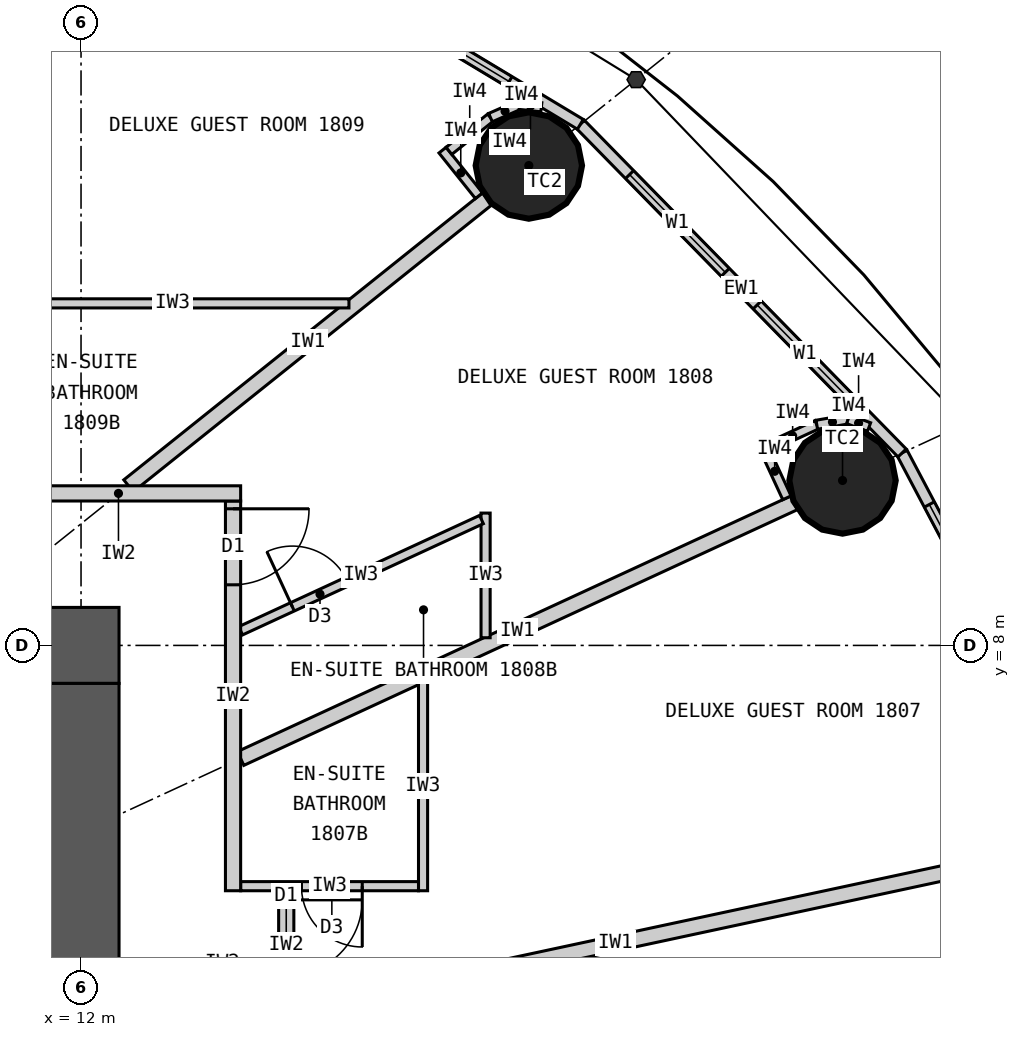
"""IFC4 building model, lengths in metres.
Left out: names, types, materials, properties, quantities, classifications, styles, units other than length and angle.
Written with IfcOpenShell. Run it as: python <this file> out.ifc"""

import sys

from ifc_helpers import new_model, si_unit, direction, frame, frame_2d, origin, origin_2d, place, context, subcontext, project, spatial, rectangle, circle, extrude, element, fill, save


model = new_model("IFC4")
c1 = context("Model", 3, precision=1e-05, world=origin(), true_north=direction((0.0, 1.0)))
c2 = subcontext(c1, "Body", "Model", "MODEL_VIEW")
j1 = project(units=[si_unit("LENGTHUNIT", "METRE"), si_unit("PLANEANGLEUNIT", "RADIAN")], contexts=[c1])
p1 = place(None, origin())
s1 = spatial("IfcSite", under=j1, at=p1, CompositionType="ELEMENT")
p2 = place(p1, origin())
s2 = spatial("IfcBuilding", under=s1, at=p2, CompositionType="ELEMENT")
p3 = place(p2, frame((0.0, 0.0, 73.8)))
s3 = spatial("IfcBuildingStorey", under=s2, at=p3, CompositionType="ELEMENT", Elevation=73.8)
for number, where, z_axis, x_axis in (
    (1, (22.019, 10.17, 0.0), (0.0, 0.0, 1.0), (1.0, 0.0, 0.0)),
    (2, (17.892, 14.313, 0.0), (0.0, 0.0, 1.0), (1.0, 0.0, 0.0)),
):
    element("IfcColumn", number, at=place(p3, frame(where, z_axis=z_axis, x_axis=x_axis)), inside=s3, PredefinedType="COLUMN", context=c2, shape_type="SweptSolid", body=[
        extrude(circle(Radius=0.7, at=origin_2d()), origin(), (0.0, 0.0, 1.0), 3.3),
    ])
p4 = place(p3, frame((-12.5, 8.0, 0.0), z_axis=(0.0, 0.0, 1.0), x_axis=(1.0, 0.0, 0.0)))
e3 = element("IfcWall", 3, at=p4, inside=s3, PredefinedType="SHEAR", context=c2, shape_type="SweptSolid", body=[
    extrude(rectangle(XDim=25.0, YDim=1.0, at=frame_2d((12.5, 0.0))), origin(), (0.0, 0.0, 1.0), 3.3),
])
p5 = place(p4, frame((11.2, 0.0, 0.0)))
e4 = element("IfcOpeningElement", 4, at=p5, cuts=e3, PredefinedType="OPENING", context=c2, shape_type="SweptSolid", body=[
    extrude(rectangle(XDim=1.2, YDim=2.2, at=frame_2d((0.6, 1.1))), frame((0.0, 0.51, 0.0), z_axis=(0.0, -1.0, 0.0), x_axis=(1.0, 0.0, 0.0)), (0.0, 0.0, 1.0), 1.02),
])
p6 = place(p4, frame((18.8, 0.0, 0.0)))
e5 = element("IfcOpeningElement", 5, at=p6, cuts=e3, PredefinedType="OPENING", context=c2, shape_type="SweptSolid", body=[
    extrude(rectangle(XDim=0.9, YDim=2.2, at=frame_2d((0.45, 1.1))), frame((0.0, 0.51, 0.0), z_axis=(0.0, -1.0, 0.0), x_axis=(1.0, 0.0, 0.0)), (0.0, 0.0, 1.0), 1.02),
])
p7 = place(p3, frame((12.0, -7.5, 0.0), z_axis=(0.0, 0.0, 1.0), x_axis=(0.0, 1.0, 0.0)))
e6 = element("IfcWall", 6, at=p7, inside=s3, PredefinedType="SHEAR", context=c2, shape_type="SweptSolid", body=[
    extrude(rectangle(XDim=15.0, YDim=1.0, at=frame_2d((7.5, 0.0))), origin(), (0.0, 0.0, 1.0), 3.3),
])
p8 = place(p7, frame((6.6, 0.0, 0.0)))
e7 = element("IfcOpeningElement", 7, at=p8, cuts=e6, PredefinedType="OPENING", context=c2, shape_type="SweptSolid", body=[
    extrude(rectangle(XDim=1.8, YDim=2.2, at=frame_2d((0.9, 1.1))), frame((0.0, 0.51, 0.0), z_axis=(0.0, -1.0, 0.0), x_axis=(1.0, 0.0, 0.0)), (0.0, 0.0, 1.0), 1.02),
])
p9 = place(p3, frame((25.482, 5.462, 0.0), z_axis=(0.0, 0.0, 1.0), x_axis=(-0.467296867008, 0.884100468321, 0.0)))
e8 = element("IfcWall", 8, at=p9, inside=s3, PredefinedType="ELEMENTEDWALL", context=c2, shape_type="SweptSolid", body=[
    extrude(rectangle(XDim=5.734, YDim=0.15, at=frame_2d((2.867, 0.0))), origin(), (0.0, 0.0, 1.0), 3.12),
])
p10 = place(p9, frame((0.767, 0.0, 0.9)))
e9 = element("IfcOpeningElement", 9, at=p10, cuts=e8, PredefinedType="OPENING", context=c2, shape_type="SweptSolid", body=[
    extrude(rectangle(XDim=1.8, YDim=1.9, at=frame_2d((0.9, 0.95))), frame((0.0, 0.085, 0.0), z_axis=(0.0, -1.0, 0.0), x_axis=(1.0, 0.0, 0.0)), (0.0, 0.0, 1.0), 0.17),
])
p11 = place(p9, frame((3.167, 0.0, 0.9)))
e10 = element("IfcOpeningElement", 10, at=p11, cuts=e8, PredefinedType="OPENING", context=c2, shape_type="SweptSolid", body=[
    extrude(rectangle(XDim=1.8, YDim=1.9, at=frame_2d((0.9, 0.95))), frame((0.0, 0.085, 0.0), z_axis=(0.0, -1.0, 0.0), x_axis=(1.0, 0.0, 0.0)), (0.0, 0.0, 1.0), 0.17),
])
p12 = place(p3, frame((22.803, 10.532, 0.0), z_axis=(0.0, 0.0, 1.0), x_axis=(-0.699602905915, 0.714531856557, 0.0)))
e11 = element("IfcWall", 11, at=p12, inside=s3, PredefinedType="ELEMENTEDWALL", context=c2, shape_type="SweptSolid", body=[
    extrude(rectangle(XDim=6.051, YDim=0.15, at=frame_2d((3.025, 0.0))), origin(), (0.0, 0.0, 1.0), 3.12),
])
p13 = place(p12, frame((0.926, 0.0, 0.9)))
e12 = element("IfcOpeningElement", 12, at=p13, cuts=e11, PredefinedType="OPENING", context=c2, shape_type="SweptSolid", body=[
    extrude(rectangle(XDim=1.8, YDim=1.9, at=frame_2d((0.9, 0.95))), frame((0.0, 0.085, 0.0), z_axis=(0.0, -1.0, 0.0), x_axis=(1.0, 0.0, 0.0)), (0.0, 0.0, 1.0), 0.17),
])
p14 = place(p12, frame((3.325, 0.0, 0.9)))
e13 = element("IfcOpeningElement", 13, at=p14, cuts=e11, PredefinedType="OPENING", context=c2, shape_type="SweptSolid", body=[
    extrude(rectangle(XDim=1.8, YDim=1.9, at=frame_2d((0.9, 0.95))), frame((0.0, 0.085, 0.0), z_axis=(0.0, -1.0, 0.0), x_axis=(1.0, 0.0, 0.0)), (0.0, 0.0, 1.0), 0.17),
])
p15 = place(p3, frame((18.57, 14.856, 0.0), z_axis=(0.0, 0.0, 1.0), x_axis=(-0.856983180864, 0.515344377787, 0.0)))
e14 = element("IfcWall", 14, at=p15, inside=s3, PredefinedType="ELEMENTEDWALL", context=c2, shape_type="SweptSolid", body=[
    extrude(rectangle(XDim=6.386, YDim=0.15, at=frame_2d((3.193, 0.0))), origin(), (0.0, 0.0, 1.0), 3.12),
])
p16 = place(p15, frame((1.093, 0.0, 0.9)))
e15 = element("IfcOpeningElement", 15, at=p16, cuts=e14, PredefinedType="OPENING", context=c2, shape_type="SweptSolid", body=[
    extrude(rectangle(XDim=1.8, YDim=1.9, at=frame_2d((0.9, 0.95))), frame((0.0, 0.085, 0.0), z_axis=(0.0, -1.0, 0.0), x_axis=(1.0, 0.0, 0.0)), (0.0, 0.0, 1.0), 0.17),
])
p17 = place(p15, frame((3.493, 0.0, 0.9)))
e16 = element("IfcOpeningElement", 16, at=p17, cuts=e14, PredefinedType="OPENING", context=c2, shape_type="SweptSolid", body=[
    extrude(rectangle(XDim=1.8, YDim=1.9, at=frame_2d((0.9, 0.95))), frame((0.0, 0.085, 0.0), z_axis=(0.0, -1.0, 0.0), x_axis=(1.0, 0.0, 0.0)), (0.0, 0.0, 1.0), 0.17),
])
p18 = place(p3, frame((14.1, 3.022, 0.0), z_axis=(0.0, 0.0, 1.0), x_axis=(0.977790014929, 0.209586943072, 0.0)))
e17 = element("IfcWall", 17, at=p18, inside=s3, PredefinedType="PARTITIONING", context=c2, shape_type="SweptSolid", body=[
    extrude(rectangle(XDim=10.087, YDim=0.2, at=frame_2d((5.043, 0.0))), origin(), (0.0, 0.0, 1.0), 2.32),
])
p19 = place(p3, frame((14.1, 6.512, 0.0), z_axis=(0.0, 0.0, 1.0), x_axis=(0.907832871056, 0.419332181247, 0.0)))
e18 = element("IfcWall", 18, at=p19, inside=s3, PredefinedType="PARTITIONING", context=c2, shape_type="SweptSolid", body=[
    extrude(rectangle(XDim=8.023, YDim=0.2, at=frame_2d((4.011, 0.0))), origin(), (0.0, 0.0, 1.0), 2.32),
])
p20 = place(p3, frame((12.625, 10.1, 0.0), z_axis=(0.0, 0.0, 1.0), x_axis=(0.780892451574, 0.624665493744, 0.0)))
e19 = element("IfcWall", 19, at=p20, inside=s3, PredefinedType="PARTITIONING", context=c2, shape_type="SweptSolid", body=[
    extrude(rectangle(XDim=6.045, YDim=0.2, at=frame_2d((3.022, 0.0))), origin(), (0.0, 0.0, 1.0), 2.32),
])
p21 = place(p3, frame((7.289, 10.1, 0.0), z_axis=(0.0, 0.0, 1.0), x_axis=(0.585198353053, 0.810890182197, 0.0)))
e20 = element("IfcWall", 20, at=p21, inside=s3, PredefinedType="PARTITIONING", context=c2, shape_type="SweptSolid", body=[
    extrude(rectangle(XDim=8.36, YDim=0.2, at=frame_2d((4.18, 0.0))), origin(), (0.0, 0.0, 1.0), 2.32),
])
p22 = place(p3, frame((16.5, 7.521, 0.0), z_axis=(0.0, 0.0, 1.0), x_axis=(0.0, -1.0, 0.0)))
e21 = element("IfcWall", 21, at=p22, inside=s3, PredefinedType="PARTITIONING", context=c2, shape_type="SweptSolid", body=[
    extrude(rectangle(XDim=2.749, YDim=0.12, at=frame_2d((1.374, 0.0))), origin(), (0.0, 0.0, 1.0), 3.12),
])
p23 = place(p3, frame((14.1, 4.833, 0.0), z_axis=(0.0, 0.0, 1.0), x_axis=(1.0, 0.0, 0.0)))
e22 = element("IfcWall", 22, at=p23, inside=s3, PredefinedType="PARTITIONING", context=c2, shape_type="SweptSolid", body=[
    extrude(rectangle(XDim=2.34, YDim=0.12, at=frame_2d((1.17, 0.0))), origin(), (0.0, 0.0, 1.0), 3.12),
])
p24 = place(p23, frame((0.8, 0.0, 0.0)))
e23 = element("IfcOpeningElement", 23, at=p24, cuts=e22, PredefinedType="OPENING", context=c2, shape_type="SweptSolid", body=[
    extrude(rectangle(XDim=0.8, YDim=2.1, at=frame_2d((0.4, 1.05))), frame((0.0, 0.07, 0.0), z_axis=(0.0, -1.0, 0.0), x_axis=(1.0, 0.0, 0.0)), (0.0, 0.0, 1.0), 0.14),
])
p25 = place(p3, frame((17.323, 8.101, 0.0), z_axis=(0.0, 0.0, 1.0), x_axis=(0.0, 1.0, 0.0)))
e24 = element("IfcWall", 24, at=p25, inside=s3, PredefinedType="PARTITIONING", context=c2, shape_type="SweptSolid", body=[
    extrude(rectangle(XDim=1.64, YDim=0.12, at=frame_2d((0.82, 0.0))), origin(), (0.0, 0.0, 1.0), 3.12),
])
p26 = place(p3, frame((14.1, 8.193, 0.0), z_axis=(0.0, 0.0, 1.0), x_axis=(0.907836493557, 0.419324338628, 0.0)))
e25 = element("IfcWall", 25, at=p26, inside=s3, PredefinedType="PARTITIONING", context=c2, shape_type="SweptSolid", body=[
    extrude(rectangle(XDim=3.49, YDim=0.12, at=frame_2d((1.745, 0.0))), origin(), (0.0, 0.0, 1.0), 3.12),
])
p27 = place(p26, frame((0.75, 0.0, 0.0)))
e26 = element("IfcOpeningElement", 26, at=p27, cuts=e25, PredefinedType="OPENING", context=c2, shape_type="SweptSolid", body=[
    extrude(rectangle(XDim=0.8, YDim=2.1, at=frame_2d((0.4, 1.05))), frame((0.0, 0.07, 0.0), z_axis=(0.0, -1.0, 0.0), x_axis=(1.0, 0.0, 0.0)), (0.0, 0.0, 1.0), 0.14),
])
p28 = place(p3, frame((15.525, 12.5, 0.0), z_axis=(0.0, 0.0, 1.0), x_axis=(-1.0, 0.0, 0.0)))
e27 = element("IfcWall", 27, at=p28, inside=s3, PredefinedType="PARTITIONING", context=c2, shape_type="SweptSolid", body=[
    extrude(rectangle(XDim=4.64, YDim=0.12, at=frame_2d((2.32, 0.0))), origin(), (0.0, 0.0, 1.0), 3.12),
])
p29 = place(p3, frame((14.7, 3.333, 0.0), z_axis=(0.0, 0.0, 1.0), x_axis=(0.0, 1.0, 0.0)))
e28 = element("IfcWall", 28, at=p29, inside=s3, PredefinedType="PARTITIONING", context=c2, shape_type="SweptSolid", body=[
    extrude(rectangle(XDim=1.44, YDim=0.2, at=frame_2d((0.72, 0.0))), origin(), (0.0, 0.0, 1.0), 3.12),
])
p30 = place(p29, frame((0.32, 0.0, 0.0)))
e29 = element("IfcOpeningElement", 29, at=p30, cuts=e28, PredefinedType="OPENING", context=c2, shape_type="SweptSolid", body=[
    extrude(rectangle(XDim=1.0, YDim=2.2, at=frame_2d((0.5, 1.1))), frame((0.0, 0.11, 0.0), z_axis=(0.0, -1.0, 0.0), x_axis=(1.0, 0.0, 0.0)), (0.0, 0.0, 1.0), 0.22),
])
p31 = place(p3, frame((14.0, 4.772, 0.0), z_axis=(0.0, 0.0, 1.0), x_axis=(0.0, 1.0, 0.0)))
e30 = element("IfcWall", 30, at=p31, inside=s3, PredefinedType="PARTITIONING", context=c2, shape_type="SweptSolid", body=[
    extrude(rectangle(XDim=5.127, YDim=0.2, at=frame_2d((2.564, 0.0))), origin(), (0.0, 0.0, 1.0), 3.12),
])
p32 = place(p31, frame((4.025, 0.0, 0.0)))
e31 = element("IfcOpeningElement", 31, at=p32, cuts=e30, PredefinedType="OPENING", context=c2, shape_type="SweptSolid", body=[
    extrude(rectangle(XDim=1.0, YDim=2.2, at=frame_2d((0.5, 1.1))), frame((0.0, 0.11, 0.0), z_axis=(0.0, -1.0, 0.0), x_axis=(1.0, 0.0, 0.0)), (0.0, 0.0, 1.0), 0.22),
])
p33 = place(p3, frame((10.885, 10.0, 0.0), z_axis=(0.0, 0.0, 1.0), x_axis=(1.0, 0.0, 0.0)))
e32 = element("IfcWall", 32, at=p33, inside=s3, PredefinedType="PARTITIONING", context=c2, shape_type="SweptSolid", body=[
    extrude(rectangle(XDim=3.215, YDim=0.2, at=frame_2d((1.607, 0.0))), origin(), (0.0, 0.0, 1.0), 3.12),
])
p34 = place(p3, frame((21.287, 9.942, 0.0), z_axis=(0.0, 0.0, 1.0), x_axis=(-0.419259891039, 0.907866258744, 0.0)))
e33 = element("IfcWall", 33, at=p34, inside=s3, PredefinedType="PARTITIONING", context=c2, shape_type="SweptSolid", body=[
    extrude(rectangle(XDim=0.768, YDim=0.12, at=frame_2d((0.384, 0.0))), origin(), (0.0, 0.0, 1.0), 3.12),
])
p35 = place(p3, frame((21.045, 10.61, 0.0), z_axis=(0.0, 0.0, 1.0), x_axis=(0.907877701396, 0.419235112208, 0.0)))
e34 = element("IfcWall", 34, at=p35, inside=s3, PredefinedType="PARTITIONING", context=c2, shape_type="SweptSolid", body=[
    extrude(rectangle(XDim=0.7, YDim=0.12, at=frame_2d((0.35, 0.0))), origin(), (0.0, 0.0, 1.0), 3.12),
])
p36 = place(p3, frame((21.68, 10.903, 0.0), z_axis=(0.0, 0.0, 1.0), x_axis=(0.985446622073, 0.169985161247, 0.0)))
e35 = element("IfcWall", 35, at=p36, inside=s3, PredefinedType="PARTITIONING", context=c2, shape_type="SweptSolid", body=[
    extrude(rectangle(XDim=0.418, YDim=0.12, at=frame_2d((0.209, 0.0))), origin(), (0.0, 0.0, 1.0), 3.12),
])
p37 = place(p3, frame((22.092, 10.974, 0.0), z_axis=(0.0, 0.0, 1.0), x_axis=(0.938428160676, -0.345474437912, 0.0)))
e36 = element("IfcWall", 36, at=p37, inside=s3, PredefinedType="PARTITIONING", context=c2, shape_type="SweptSolid", body=[
    extrude(rectangle(XDim=0.294, YDim=0.12, at=frame_2d((0.147, 0.0))), origin(), (0.0, 0.0, 1.0), 3.12),
])
p38 = place(p3, frame((17.236, 13.917, 0.0), z_axis=(0.0, 0.0, 1.0), x_axis=(-0.624695047554, 0.780868809443, 0.0)))
e37 = element("IfcWall", 37, at=p38, inside=s3, PredefinedType="PARTITIONING", context=c2, shape_type="SweptSolid", body=[
    extrude(rectangle(XDim=0.768, YDim=0.12, at=frame_2d((0.384, 0.0))), origin(), (0.0, 0.0, 1.0), 3.12),
])
p39 = place(p3, frame((16.841, 14.507, 0.0), z_axis=(0.0, 0.0, 1.0), x_axis=(0.780902834923, 0.62465251333, 0.0)))
e38 = element("IfcWall", 38, at=p39, inside=s3, PredefinedType="PARTITIONING", context=c2, shape_type="SweptSolid", body=[
    extrude(rectangle(XDim=0.7, YDim=0.12, at=frame_2d((0.35, 0.0))), origin(), (0.0, 0.0, 1.0), 3.12),
])
p40 = place(p3, frame((17.387, 14.944, 0.0), z_axis=(0.0, 0.0, 1.0), x_axis=(0.916036698064, 0.401094462441, 0.0)))
e39 = element("IfcWall", 39, at=p40, inside=s3, PredefinedType="PARTITIONING", context=c2, shape_type="SweptSolid", body=[
    extrude(rectangle(XDim=0.418, YDim=0.12, at=frame_2d((0.209, 0.0))), origin(), (0.0, 0.0, 1.0), 3.12),
])
p41 = place(p3, frame((17.77, 15.112, 0.0), z_axis=(0.0, 0.0, 1.0), x_axis=(0.993904401174, -0.110245368731, 0.0)))
e40 = element("IfcWall", 40, at=p41, inside=s3, PredefinedType="PARTITIONING", context=c2, shape_type="SweptSolid", body=[
    extrude(rectangle(XDim=0.288, YDim=0.12, at=frame_2d((0.144, 0.0))), origin(), (0.0, 0.0, 1.0), 3.12),
])
p42 = place(p11, origin())
e41 = element("IfcWindow", 41, at=p42, inside=s3, PartitioningType="SINGLE_PANEL", PredefinedType="WINDOW", context=c2, shape_type="SweptSolid", body=[
    extrude(rectangle(XDim=1.8, YDim=1.9, at=frame_2d((0.9, 0.95))), frame((0.0, 0.03, 0.0), z_axis=(0.0, -1.0, 0.0), x_axis=(1.0, 0.0, 0.0)), (0.0, 0.0, 1.0), 0.06),
])
fill(e10, e41)
p43 = place(p13, origin())
e42 = element("IfcWindow", 42, at=p43, inside=s3, PartitioningType="SINGLE_PANEL", PredefinedType="WINDOW", context=c2, shape_type="SweptSolid", body=[
    extrude(rectangle(XDim=1.8, YDim=1.9, at=frame_2d((0.9, 0.95))), frame((0.0, 0.03, 0.0), z_axis=(0.0, -1.0, 0.0), x_axis=(1.0, 0.0, 0.0)), (0.0, 0.0, 1.0), 0.06),
])
fill(e12, e42)
p44 = place(p14, origin())
e43 = element("IfcWindow", 43, at=p44, inside=s3, PartitioningType="SINGLE_PANEL", PredefinedType="WINDOW", context=c2, shape_type="SweptSolid", body=[
    extrude(rectangle(XDim=1.8, YDim=1.9, at=frame_2d((0.9, 0.95))), frame((0.0, 0.03, 0.0), z_axis=(0.0, -1.0, 0.0), x_axis=(1.0, 0.0, 0.0)), (0.0, 0.0, 1.0), 0.06),
])
fill(e13, e43)
p45 = place(p16, origin())
e44 = element("IfcWindow", 44, at=p45, inside=s3, PartitioningType="SINGLE_PANEL", PredefinedType="WINDOW", context=c2, shape_type="SweptSolid", body=[
    extrude(rectangle(XDim=1.8, YDim=1.9, at=frame_2d((0.9, 0.95))), frame((0.0, 0.03, 0.0), z_axis=(0.0, -1.0, 0.0), x_axis=(1.0, 0.0, 0.0)), (0.0, 0.0, 1.0), 0.06),
])
fill(e15, e44)
p46 = place(p24, origin())
e45 = element("IfcDoor", 45, at=p46, inside=s3, OperationType="SINGLE_SWING_RIGHT", PredefinedType="DOOR", context=c2, shape_type="SweptSolid", body=[
    extrude(rectangle(XDim=0.8, YDim=2.1, at=frame_2d((0.4, 1.05))), frame((0.0, 0.025, 0.0), z_axis=(0.0, -1.0, 0.0), x_axis=(1.0, 0.0, 0.0)), (0.0, 0.0, 1.0), 0.05),
])
fill(e23, e45)
p47 = place(p30, origin())
e46 = element("IfcDoor", 46, at=p47, inside=s3, OperationType="SINGLE_SWING_RIGHT", PredefinedType="DOOR", context=c2, shape_type="SweptSolid", body=[
    extrude(rectangle(XDim=1.0, YDim=2.2, at=frame_2d((0.5, 1.1))), frame((0.0, 0.025, 0.0), z_axis=(0.0, -1.0, 0.0), x_axis=(1.0, 0.0, 0.0)), (0.0, 0.0, 1.0), 0.05),
])
fill(e29, e46)
p48 = place(p27, origin())
e47 = element("IfcDoor", 47, at=p48, inside=s3, OperationType="SINGLE_SWING_LEFT", PredefinedType="DOOR", context=c2, shape_type="SweptSolid", body=[
    extrude(rectangle(XDim=0.8, YDim=2.1, at=frame_2d((0.4, 1.05))), frame((0.0, 0.025, 0.0), z_axis=(0.0, -1.0, 0.0), x_axis=(1.0, 0.0, 0.0)), (0.0, 0.0, 1.0), 0.05),
])
fill(e26, e47)
p49 = place(p32, origin())
e48 = element("IfcDoor", 48, at=p49, inside=s3, OperationType="SINGLE_SWING_RIGHT", PredefinedType="DOOR", context=c2, shape_type="SweptSolid", body=[
    extrude(rectangle(XDim=1.0, YDim=2.2, at=frame_2d((0.5, 1.1))), frame((0.0, 0.025, 0.0), z_axis=(0.0, -1.0, 0.0), x_axis=(1.0, 0.0, 0.0)), (0.0, 0.0, 1.0), 0.05),
])
fill(e31, e48)
save(model, sys.argv[1])
